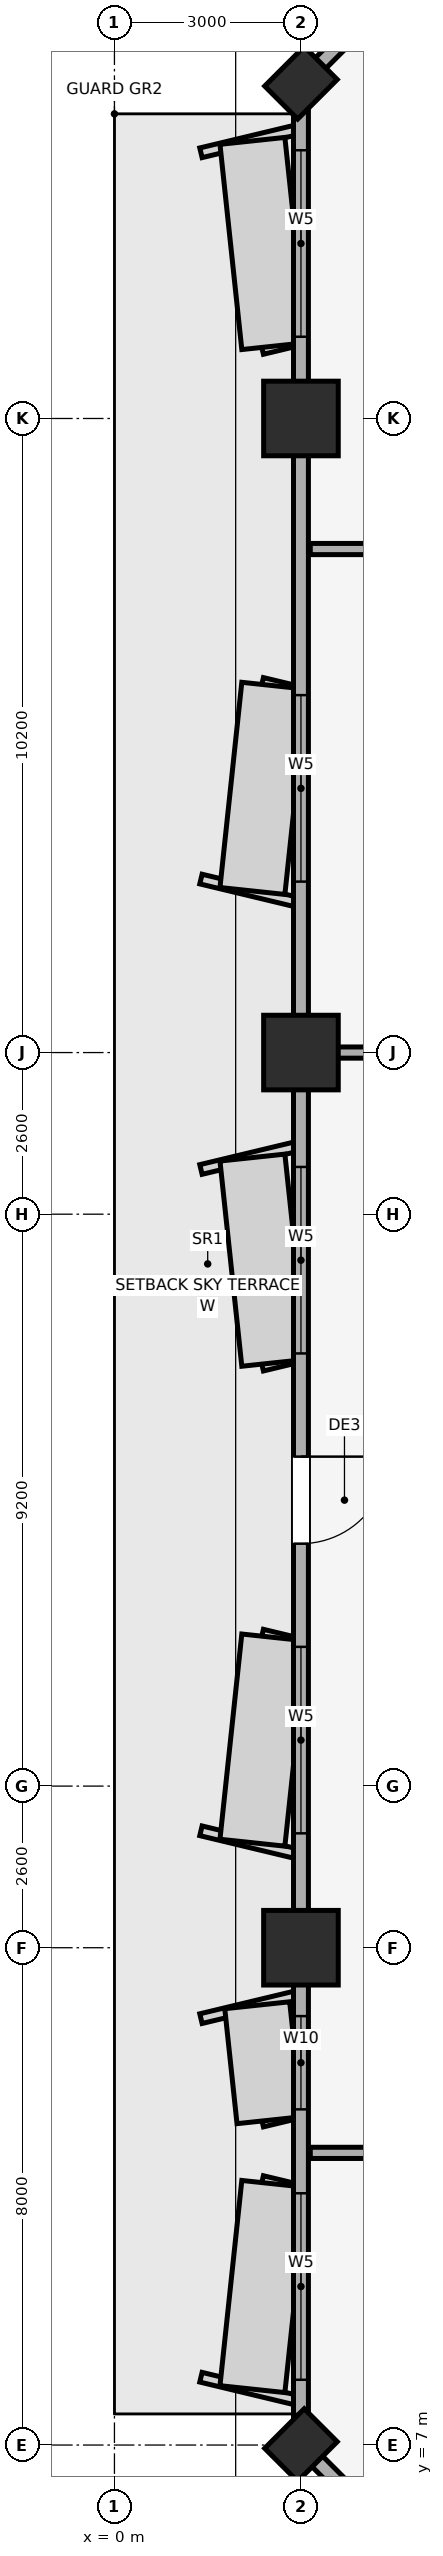
"""IFC4 building model, lengths in metres.
Left out: names, types, materials, properties, quantities, classifications, styles, units other than length and angle.
Written with IfcOpenShell. Run it as: python <this file> out.ifc"""

import sys

from ifc_helpers import new_model, si_unit, direction, frame, frame_2d, origin, origin_2d, place, context, subcontext, project, spatial, rectangle, extrude, element, fill, save


model = new_model("IFC4")
c1 = context("Model", 3, precision=1e-05, world=origin(), true_north=direction((0.0, 1.0)))
c2 = subcontext(c1, "Body", "Model", "MODEL_VIEW")
j1 = project(units=[si_unit("LENGTHUNIT", "METRE"), si_unit("PLANEANGLEUNIT", "RADIAN")], contexts=[c1])
p1 = place(None, origin())
s1 = spatial("IfcSite", under=j1, at=p1, CompositionType="ELEMENT")
p2 = place(p1, origin())
s2 = spatial("IfcBuilding", under=s1, at=p2, CompositionType="ELEMENT")
p3 = place(p2, frame((0.0, 0.0, 135.35)))
s3 = spatial("IfcBuildingStorey", under=s2, at=p3, CompositionType="ELEMENT", Elevation=135.35)
for number, where, z_axis, x_axis in (
    (1, (3.0, 15.0, 0.0), (0.0, 0.0, 1.0), (1.0, 0.0, 0.0)),
    (2, (3.0, 29.4, 0.0), (0.0, 0.0, 1.0), (1.0, 0.0, 0.0)),
    (3, (3.0, 39.6, 0.0), (0.0, 0.0, 1.0), (1.0, 0.0, 0.0)),
):
    element("IfcColumn", number, at=place(p3, frame(where, z_axis=z_axis, x_axis=x_axis)), inside=s3, PredefinedType="COLUMN", context=c2, shape_type="SweptSolid", body=[
        extrude(rectangle(XDim=1.2, YDim=1.2, at=origin_2d()), origin(), (0.0, 0.0, 1.0), 3.56),
    ])
for number, where, z_axis, x_axis in (
    (4, (3.0, 45.0, 0.0), (0.0, 0.0, 1.0), (0.707, 0.707, 0.0)),
    (5, (3.0, 7.0, 0.0), (0.0, 0.0, 1.0), (0.707, 0.707, 0.0)),
):
    element("IfcColumn", number, at=place(p3, frame(where, z_axis=z_axis, x_axis=x_axis)), inside=s3, PredefinedType="PILASTER", context=c2, shape_type="SweptSolid", body=[
        extrude(rectangle(XDim=0.9, YDim=0.75, at=origin_2d()), origin(), (0.0, 0.0, 1.0), 3.56),
    ])
p4 = place(p3, frame((7.0, 49.0, 0.0), z_axis=(0.0, 0.0, 1.0), x_axis=(-0.707106781187, -0.707106781187, 0.0)))
e6 = element("IfcWall", 6, at=p4, inside=s3, PredefinedType="SOLIDWALL", context=c2, shape_type="SweptSolid", body=[
    extrude(rectangle(XDim=5.657, YDim=0.24, at=frame_2d((2.828, 0.0))), origin(), (0.0, 0.0, 1.0), 2.61),
])
p5 = place(p4, frame((1.778, 0.0, 0.85)))
e7 = element("IfcOpeningElement", 7, at=p5, cuts=e6, PredefinedType="OPENING", context=c2, shape_type="SweptSolid", body=[
    extrude(rectangle(XDim=2.1, YDim=1.6, at=frame_2d((1.05, 0.8))), frame((0.0, 0.13, 0.0), z_axis=(0.0, -1.0, 0.0), x_axis=(1.0, 0.0, 0.0)), (0.0, 0.0, 1.0), 0.26),
])
p6 = place(p3, frame((3.0, 45.0, 0.0), z_axis=(0.0, 0.0, 1.0), x_axis=(0.0, -1.0, 0.0)))
e8 = element("IfcWall", 8, at=p6, inside=s3, PredefinedType="SOLIDWALL", context=c2, shape_type="SweptSolid", body=[
    extrude(rectangle(XDim=38.0, YDim=0.24, at=frame_2d((19.0, 0.0))), origin(), (0.0, 0.0, 1.0), 2.61),
])
p7 = place(p6, frame((22.1, 0.0, 0.0)))
e9 = element("IfcOpeningElement", 9, at=p7, cuts=e8, PredefinedType="OPENING", context=c2, shape_type="SweptSolid", body=[
    extrude(rectangle(XDim=1.4, YDim=2.2, at=frame_2d((0.7, 1.1))), frame((0.0, 0.13, 0.0), z_axis=(0.0, -1.0, 0.0), x_axis=(1.0, 0.0, 0.0)), (0.0, 0.0, 1.0), 0.26),
])
p8 = place(p6, frame((33.95, 0.0, 0.85)))
e10 = element("IfcOpeningElement", 10, at=p8, cuts=e8, PredefinedType="OPENING", context=c2, shape_type="SweptSolid", body=[
    extrude(rectangle(XDim=3.0, YDim=1.5, at=frame_2d((1.5, 0.75))), frame((0.0, 0.13, 0.0), z_axis=(0.0, -1.0, 0.0), x_axis=(1.0, 0.0, 0.0)), (0.0, 0.0, 1.0), 0.26),
])
p9 = place(p6, frame((31.1, 0.0, 0.85)))
e11 = element("IfcOpeningElement", 11, at=p9, cuts=e8, PredefinedType="OPENING", context=c2, shape_type="SweptSolid", body=[
    extrude(rectangle(XDim=1.5, YDim=1.4, at=frame_2d((0.75, 0.7))), frame((0.0, 0.13, 0.0), z_axis=(0.0, -1.0, 0.0), x_axis=(1.0, 0.0, 0.0)), (0.0, 0.0, 1.0), 0.26),
])
p10 = place(p6, frame((25.16, 0.0, 0.85)))
e12 = element("IfcOpeningElement", 12, at=p10, cuts=e8, PredefinedType="OPENING", context=c2, shape_type="SweptSolid", body=[
    extrude(rectangle(XDim=3.0, YDim=1.5, at=frame_2d((1.5, 0.75))), frame((0.0, 0.13, 0.0), z_axis=(0.0, -1.0, 0.0), x_axis=(1.0, 0.0, 0.0)), (0.0, 0.0, 1.0), 0.26),
])
p11 = place(p6, frame((17.44, 0.0, 0.85)))
e13 = element("IfcOpeningElement", 13, at=p11, cuts=e8, PredefinedType="OPENING", context=c2, shape_type="SweptSolid", body=[
    extrude(rectangle(XDim=3.0, YDim=1.5, at=frame_2d((1.5, 0.75))), frame((0.0, 0.13, 0.0), z_axis=(0.0, -1.0, 0.0), x_axis=(1.0, 0.0, 0.0)), (0.0, 0.0, 1.0), 0.26),
])
p12 = place(p6, frame((9.85, 0.0, 0.85)))
e14 = element("IfcOpeningElement", 14, at=p12, cuts=e8, PredefinedType="OPENING", context=c2, shape_type="SweptSolid", body=[
    extrude(rectangle(XDim=3.0, YDim=1.5, at=frame_2d((1.5, 0.75))), frame((0.0, 0.13, 0.0), z_axis=(0.0, -1.0, 0.0), x_axis=(1.0, 0.0, 0.0)), (0.0, 0.0, 1.0), 0.26),
])
p13 = place(p6, frame((1.085, 0.0, 0.85)))
e15 = element("IfcOpeningElement", 15, at=p13, cuts=e8, PredefinedType="OPENING", context=c2, shape_type="SweptSolid", body=[
    extrude(rectangle(XDim=3.0, YDim=1.5, at=frame_2d((1.5, 0.75))), frame((0.0, 0.13, 0.0), z_axis=(0.0, -1.0, 0.0), x_axis=(1.0, 0.0, 0.0)), (0.0, 0.0, 1.0), 0.26),
])
p14 = place(p3, frame((3.0, 7.0, 0.0), z_axis=(0.0, 0.0, 1.0), x_axis=(0.707106781187, -0.707106781187, 0.0)))
e16 = element("IfcWall", 16, at=p14, inside=s3, PredefinedType="SOLIDWALL", context=c2, shape_type="SweptSolid", body=[
    extrude(rectangle(XDim=5.657, YDim=0.24, at=frame_2d((2.828, 0.0))), origin(), (0.0, 0.0, 1.0), 2.61),
])
p15 = place(p14, frame((1.778, 0.0, 0.85)))
e17 = element("IfcOpeningElement", 17, at=p15, cuts=e16, PredefinedType="OPENING", context=c2, shape_type="SweptSolid", body=[
    extrude(rectangle(XDim=2.1, YDim=1.6, at=frame_2d((1.05, 0.8))), frame((0.0, 0.13, 0.0), z_axis=(0.0, -1.0, 0.0), x_axis=(1.0, 0.0, 0.0)), (0.0, 0.0, 1.0), 0.26),
])
p16 = place(p3, frame((3.15, 11.7, 0.0), z_axis=(0.0, 0.0, 1.0), x_axis=(1.0, 0.0, 0.0)))
e18 = element("IfcWall", 18, at=p16, inside=s3, PredefinedType="PARTITIONING", context=c2, shape_type="SweptSolid", body=[
    extrude(rectangle(XDim=11.05, YDim=0.18, at=frame_2d((5.525, 0.0))), origin(), (0.0, 0.0, 1.0), 3.56),
])
p17 = place(p3, frame((3.15, 29.4, 0.0), z_axis=(0.0, 0.0, 1.0), x_axis=(1.0, 0.0, 0.0)))
e19 = element("IfcWall", 19, at=p17, inside=s3, PredefinedType="PARTITIONING", context=c2, shape_type="SweptSolid", body=[
    extrude(rectangle(XDim=11.05, YDim=0.18, at=frame_2d((5.525, 0.0))), origin(), (0.0, 0.0, 1.0), 2.91),
])
p18 = place(p3, frame((3.15, 37.5, 0.0), z_axis=(0.0, 0.0, 1.0), x_axis=(1.0, 0.0, 0.0)))
e20 = element("IfcWall", 20, at=p18, inside=s3, PredefinedType="PARTITIONING", context=c2, shape_type="SweptSolid", body=[
    extrude(rectangle(XDim=11.05, YDim=0.18, at=frame_2d((5.525, 0.0))), origin(), (0.0, 0.0, 1.0), 3.56),
])
p19 = place(p7, origin())
e21 = element("IfcDoor", 21, at=p19, inside=s3, OperationType="SINGLE_SWING_LEFT", PredefinedType="DOOR", context=c2, shape_type="SweptSolid", body=[
    extrude(rectangle(XDim=1.4, YDim=2.2, at=frame_2d((0.7, 1.1))), frame((0.0, 0.025, 0.0), z_axis=(0.0, -1.0, 0.0), x_axis=(1.0, 0.0, 0.0)), (0.0, 0.0, 1.0), 0.05),
])
fill(e9, e21)
p20 = place(p8, origin())
e22 = element("IfcWindow", 22, at=p20, inside=s3, PartitioningType="SINGLE_PANEL", PredefinedType="WINDOW", context=c2, shape_type="SweptSolid", body=[
    extrude(rectangle(XDim=3.0, YDim=1.5, at=frame_2d((1.5, 0.75))), frame((0.0, 0.03, 0.0), z_axis=(0.0, -1.0, 0.0), x_axis=(1.0, 0.0, 0.0)), (0.0, 0.0, 1.0), 0.06),
])
fill(e10, e22)
p21 = place(p9, origin())
e23 = element("IfcWindow", 23, at=p21, inside=s3, PartitioningType="SINGLE_PANEL", PredefinedType="WINDOW", context=c2, shape_type="SweptSolid", body=[
    extrude(rectangle(XDim=1.5, YDim=1.4, at=frame_2d((0.75, 0.7))), frame((0.0, 0.03, 0.0), z_axis=(0.0, -1.0, 0.0), x_axis=(1.0, 0.0, 0.0)), (0.0, 0.0, 1.0), 0.06),
])
fill(e11, e23)
p22 = place(p10, origin())
e24 = element("IfcWindow", 24, at=p22, inside=s3, PartitioningType="SINGLE_PANEL", PredefinedType="WINDOW", context=c2, shape_type="SweptSolid", body=[
    extrude(rectangle(XDim=3.0, YDim=1.5, at=frame_2d((1.5, 0.75))), frame((0.0, 0.03, 0.0), z_axis=(0.0, -1.0, 0.0), x_axis=(1.0, 0.0, 0.0)), (0.0, 0.0, 1.0), 0.06),
])
fill(e12, e24)
p23 = place(p11, origin())
e25 = element("IfcWindow", 25, at=p23, inside=s3, PartitioningType="SINGLE_PANEL", PredefinedType="WINDOW", context=c2, shape_type="SweptSolid", body=[
    extrude(rectangle(XDim=3.0, YDim=1.5, at=frame_2d((1.5, 0.75))), frame((0.0, 0.03, 0.0), z_axis=(0.0, -1.0, 0.0), x_axis=(1.0, 0.0, 0.0)), (0.0, 0.0, 1.0), 0.06),
])
fill(e13, e25)
p24 = place(p12, origin())
e26 = element("IfcWindow", 26, at=p24, inside=s3, PartitioningType="SINGLE_PANEL", PredefinedType="WINDOW", context=c2, shape_type="SweptSolid", body=[
    extrude(rectangle(XDim=3.0, YDim=1.5, at=frame_2d((1.5, 0.75))), frame((0.0, 0.03, 0.0), z_axis=(0.0, -1.0, 0.0), x_axis=(1.0, 0.0, 0.0)), (0.0, 0.0, 1.0), 0.06),
])
fill(e14, e26)
p25 = place(p13, origin())
e27 = element("IfcWindow", 27, at=p25, inside=s3, PartitioningType="SINGLE_PANEL", PredefinedType="WINDOW", context=c2, shape_type="SweptSolid", body=[
    extrude(rectangle(XDim=3.0, YDim=1.5, at=frame_2d((1.5, 0.75))), frame((0.0, 0.03, 0.0), z_axis=(0.0, -1.0, 0.0), x_axis=(1.0, 0.0, 0.0)), (0.0, 0.0, 1.0), 0.06),
])
fill(e15, e27)
save(model, sys.argv[1])
